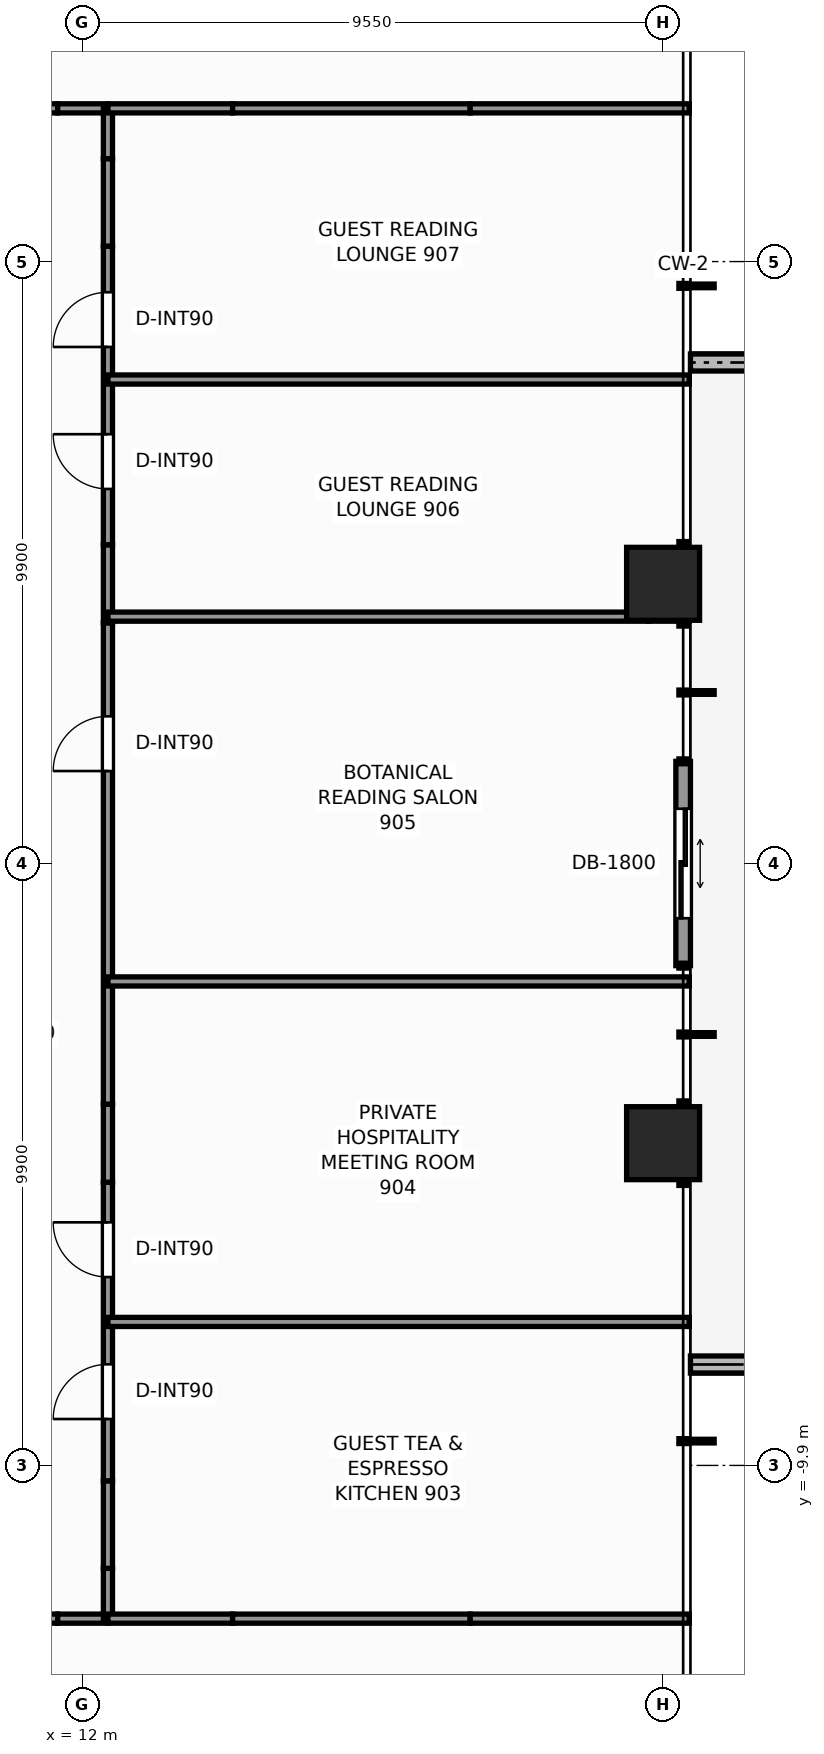
"""IFC4 building model, lengths in metres.
Left out: names, types, materials, properties, quantities, classifications, styles, units other than length and angle.
Written with IfcOpenShell. Run it as: python <this file> out.ifc"""

import sys

from ifc_helpers import new_model, si_unit, direction, frame, frame_2d, origin, origin_2d, place, context, subcontext, project, spatial, rectangle, extrude, element, fill, save


model = new_model("IFC4")
c1 = context("Model", 3, precision=1e-05, world=origin(), true_north=direction((0.0, 1.0)))
c2 = subcontext(c1, "Body", "Model", "MODEL_VIEW")
j1 = project(units=[si_unit("LENGTHUNIT", "METRE"), si_unit("PLANEANGLEUNIT", "RADIAN")], contexts=[c1])
p1 = place(None, origin())
s1 = spatial("IfcSite", under=j1, at=p1, CompositionType="ELEMENT")
p2 = place(p1, origin())
s2 = spatial("IfcBuilding", under=s1, at=p2, CompositionType="ELEMENT")
p3 = place(p2, frame((0.0, 0.0, 33.7)))
s3 = spatial("IfcBuildingStorey", under=s2, at=p3, CompositionType="ELEMENT", Elevation=33.7)
for number, where, z_axis, x_axis in (
    (1, (21.55, -4.6, 0.0), (0.0, 0.0, 1.0), (1.0, 0.0, 0.0)),
    (2, (21.55, 4.6, 0.0), (0.0, 0.0, 1.0), (1.0, 0.0, 0.0)),
):
    element("IfcColumn", number, at=place(p3, frame(where, z_axis=z_axis, x_axis=x_axis)), inside=s3, PredefinedType="COLUMN", context=c2, shape_type="SweptSolid", body=[
        extrude(rectangle(XDim=1.2, YDim=1.2, at=origin_2d()), origin(), (0.0, 0.0, 1.0), 3.3),
    ])
p4 = place(p3, frame((24.975, 8.24, -0.06), z_axis=(0.0, 0.0, 1.0), x_axis=(-1.0, 0.0, 0.0)))
e3 = element("IfcWall", 3, at=p4, inside=s3, PredefinedType="PARAPET", context=c2, shape_type="SweptSolid", body=[
    extrude(rectangle(XDim=2.975, YDim=0.28, at=frame_2d((1.487, 0.0))), origin(), (0.0, 0.0, 1.0), 0.42),
])
p5 = place(p3, frame((22.0, -8.24, -0.06), z_axis=(0.0, 0.0, 1.0), x_axis=(1.0, 0.0, 0.0)))
e4 = element("IfcWall", 4, at=p5, inside=s3, PredefinedType="PARAPET", context=c2, shape_type="SweptSolid", body=[
    extrude(rectangle(XDim=3.42, YDim=0.28, at=frame_2d((1.71, 0.0))), origin(), (0.0, 0.0, 1.0), 0.42),
])
p6 = place(p3, frame((21.88, 1.68, 0.0), z_axis=(0.0, 0.0, 1.0), x_axis=(0.0, -1.0, 0.0)))
e5 = element("IfcWall", 5, at=p6, inside=s3, PredefinedType="STANDARD", context=c2, shape_type="SweptSolid", body=[
    extrude(rectangle(XDim=3.36, YDim=0.24, at=frame_2d((1.68, 0.0))), origin(), (0.0, 0.0, 1.0), 3.06),
])
p7 = place(p6, frame((0.78, 0.0, 0.0)))
e6 = element("IfcOpeningElement", 6, at=p7, cuts=e5, PredefinedType="OPENING", context=c2, shape_type="SweptSolid", body=[
    extrude(rectangle(XDim=1.8, YDim=2.2, at=frame_2d((0.9, 1.1))), frame((0.0, 0.13, 0.0), z_axis=(0.0, -1.0, 0.0), x_axis=(1.0, 0.0, 0.0)), (0.0, 0.0, 1.0), 0.26),
])
p8 = place(p3, frame((10.154, -12.42, 0.0), z_axis=(0.0, 0.0, 1.0), x_axis=(1.0, 0.0, 0.0)))
e7 = element("IfcWall", 7, at=p8, inside=s3, PredefinedType="PARTITIONING", context=c2, shape_type="SweptSolid", body=[
    extrude(rectangle(XDim=1.439, YDim=0.15, at=frame_2d((0.72, 0.0))), origin(), (0.0, 0.0, 1.0), 1.945),
])
p9 = place(p3, frame((11.593, -12.42, 0.0), z_axis=(0.0, 0.0, 1.0), x_axis=(1.0, 0.0, 0.0)))
e8 = element("IfcWall", 8, at=p9, inside=s3, PredefinedType="PARTITIONING", context=c2, shape_type="SweptSolid", body=[
    extrude(rectangle(XDim=0.827, YDim=0.15, at=frame_2d((0.414, 0.0))), origin(), (0.0, 0.0, 1.0), 3.06),
])
p10 = place(p3, frame((10.154, 12.42, 0.0), z_axis=(0.0, 0.0, 1.0), x_axis=(1.0, 0.0, 0.0)))
e9 = element("IfcWall", 9, at=p10, inside=s3, PredefinedType="PARTITIONING", context=c2, shape_type="SweptSolid", body=[
    extrude(rectangle(XDim=1.439, YDim=0.15, at=frame_2d((0.72, 0.0))), origin(), (0.0, 0.0, 1.0), 1.945),
])
for number, where, z_axis, x_axis in (
    (10, (11.593, 12.42, 0.0), (0.0, 0.0, 1.0), (1.0, 0.0, 0.0)),
    (11, (12.42, -12.42, 0.0), (0.0, 0.0, 1.0), (0.0, 1.0, 0.0)),
):
    element("IfcWall", number, at=place(p3, frame(where, z_axis=z_axis, x_axis=x_axis)), inside=s3, PredefinedType="PARTITIONING", context=c2, shape_type="SweptSolid", body=[
        extrude(rectangle(XDim=0.827, YDim=0.15, at=frame_2d((0.414, 0.0))), origin(), (0.0, 0.0, 1.0), 3.06),
    ])
p11 = place(p3, frame((12.42, -11.593, 0.0), z_axis=(0.0, 0.0, 1.0), x_axis=(0.0, 1.0, 0.0)))
e12 = element("IfcWall", 12, at=p11, inside=s3, PredefinedType="PARTITIONING", context=c2, shape_type="SweptSolid", body=[
    extrude(rectangle(XDim=1.439, YDim=0.15, at=frame_2d((0.72, 0.0))), origin(), (0.0, 0.0, 1.0), 1.945),
])
p12 = place(p3, frame((12.42, -10.154, 0.0), z_axis=(0.0, 0.0, 1.0), x_axis=(0.0, 1.0, 0.0)))
e13 = element("IfcWall", 13, at=p12, inside=s3, PredefinedType="PARTITIONING", context=c2, shape_type="SweptSolid", body=[
    extrude(rectangle(XDim=4.912, YDim=0.15, at=frame_2d((2.456, 0.0))), origin(), (0.0, 0.0, 1.0), 3.06),
])
p13 = place(p12, frame((1.017, 0.0, 0.0)))
e14 = element("IfcOpeningElement", 14, at=p13, cuts=e13, PredefinedType="OPENING", context=c2, shape_type="SweptSolid", body=[
    extrude(rectangle(XDim=0.9, YDim=2.06, at=frame_2d((0.45, 1.03))), frame((0.0, 0.085, 0.0), z_axis=(0.0, -1.0, 0.0), x_axis=(1.0, 0.0, 0.0)), (0.0, 0.0, 1.0), 0.17),
])
p14 = place(p12, frame((3.352, 0.0, 0.0)))
e15 = element("IfcOpeningElement", 15, at=p14, cuts=e13, PredefinedType="OPENING", context=c2, shape_type="SweptSolid", body=[
    extrude(rectangle(XDim=0.9, YDim=2.06, at=frame_2d((0.45, 1.03))), frame((0.0, 0.085, 0.0), z_axis=(0.0, -1.0, 0.0), x_axis=(1.0, 0.0, 0.0)), (0.0, 0.0, 1.0), 0.17),
])
p15 = place(p3, frame((12.42, -5.242, 0.0), z_axis=(0.0, 0.0, 1.0), x_axis=(0.0, 1.0, 0.0)))
e16 = element("IfcWall", 16, at=p15, inside=s3, PredefinedType="PARTITIONING", context=c2, shape_type="SweptSolid", body=[
    extrude(rectangle(XDim=1.284, YDim=0.15, at=frame_2d((0.642, 0.0))), origin(), (0.0, 0.0, 1.0), 1.945),
])
p16 = place(p3, frame((12.42, -3.958, 0.0), z_axis=(0.0, 0.0, 1.0), x_axis=(0.0, 1.0, 0.0)))
e17 = element("IfcWall", 17, at=p16, inside=s3, PredefinedType="PARTITIONING", context=c2, shape_type="SweptSolid", body=[
    extrude(rectangle(XDim=7.916, YDim=0.15, at=frame_2d((3.958, 0.0))), origin(), (0.0, 0.0, 1.0), 2.585),
])
p17 = place(p16, frame((5.479, 0.0, 0.0)))
e18 = element("IfcOpeningElement", 18, at=p17, cuts=e17, PredefinedType="OPENING", context=c2, shape_type="SweptSolid", body=[
    extrude(rectangle(XDim=0.9, YDim=2.06, at=frame_2d((0.45, 1.03))), frame((0.0, 0.085, 0.0), z_axis=(0.0, -1.0, 0.0), x_axis=(1.0, 0.0, 0.0)), (0.0, 0.0, 1.0), 0.17),
])
p18 = place(p3, frame((12.42, 3.958, 0.0), z_axis=(0.0, 0.0, 1.0), x_axis=(0.0, 1.0, 0.0)))
e19 = element("IfcWall", 19, at=p18, inside=s3, PredefinedType="PARTITIONING", context=c2, shape_type="SweptSolid", body=[
    extrude(rectangle(XDim=1.284, YDim=0.15, at=frame_2d((0.642, 0.0))), origin(), (0.0, 0.0, 1.0), 1.945),
])
p19 = place(p3, frame((12.42, 5.242, 0.0), z_axis=(0.0, 0.0, 1.0), x_axis=(0.0, 1.0, 0.0)))
e20 = element("IfcWall", 20, at=p19, inside=s3, PredefinedType="PARTITIONING", context=c2, shape_type="SweptSolid", body=[
    extrude(rectangle(XDim=4.912, YDim=0.15, at=frame_2d((2.456, 0.0))), origin(), (0.0, 0.0, 1.0), 3.06),
])
p20 = place(p19, frame((0.919, 0.0, 0.0)))
e21 = element("IfcOpeningElement", 21, at=p20, cuts=e20, PredefinedType="OPENING", context=c2, shape_type="SweptSolid", body=[
    extrude(rectangle(XDim=0.9, YDim=2.06, at=frame_2d((0.45, 1.03))), frame((0.0, 0.085, 0.0), z_axis=(0.0, -1.0, 0.0), x_axis=(1.0, 0.0, 0.0)), (0.0, 0.0, 1.0), 0.17),
])
p21 = place(p19, frame((3.254, 0.0, 0.0)))
e22 = element("IfcOpeningElement", 22, at=p21, cuts=e20, PredefinedType="OPENING", context=c2, shape_type="SweptSolid", body=[
    extrude(rectangle(XDim=0.9, YDim=2.06, at=frame_2d((0.45, 1.03))), frame((0.0, 0.085, 0.0), z_axis=(0.0, -1.0, 0.0), x_axis=(1.0, 0.0, 0.0)), (0.0, 0.0, 1.0), 0.17),
])
p22 = place(p3, frame((12.42, 10.154, 0.0), z_axis=(0.0, 0.0, 1.0), x_axis=(0.0, 1.0, 0.0)))
e23 = element("IfcWall", 23, at=p22, inside=s3, PredefinedType="PARTITIONING", context=c2, shape_type="SweptSolid", body=[
    extrude(rectangle(XDim=1.439, YDim=0.15, at=frame_2d((0.72, 0.0))), origin(), (0.0, 0.0, 1.0), 1.945),
])
p23 = place(p3, frame((12.42, 11.593, 0.0), z_axis=(0.0, 0.0, 1.0), x_axis=(0.0, 1.0, 0.0)))
e24 = element("IfcWall", 24, at=p23, inside=s3, PredefinedType="PARTITIONING", context=c2, shape_type="SweptSolid", body=[
    extrude(rectangle(XDim=0.827, YDim=0.15, at=frame_2d((0.414, 0.0))), origin(), (0.0, 0.0, 1.0), 3.06),
])
p24 = place(p3, frame((12.42, -12.42, 0.0), z_axis=(0.0, 0.0, 1.0), x_axis=(1.0, 0.0, 0.0)))
e25 = element("IfcWall", 25, at=p24, inside=s3, PredefinedType="PARTITIONING", context=c2, shape_type="SweptSolid", body=[
    extrude(rectangle(XDim=2.05, YDim=0.15, at=frame_2d((1.025, 0.0))), origin(), (0.0, 0.0, 1.0), 3.06),
])
p25 = place(p3, frame((14.47, -12.42, 0.0), z_axis=(0.0, 0.0, 1.0), x_axis=(1.0, 0.0, 0.0)))
e26 = element("IfcWall", 26, at=p25, inside=s3, PredefinedType="PARTITIONING", context=c2, shape_type="SweptSolid", body=[
    extrude(rectangle(XDim=3.907, YDim=0.15, at=frame_2d((1.954, 0.0))), origin(), (0.0, 0.0, 1.0), 1.945),
])
p26 = place(p3, frame((18.378, -12.42, 0.0), z_axis=(0.0, 0.0, 1.0), x_axis=(1.0, 0.0, 0.0)))
e27 = element("IfcWall", 27, at=p26, inside=s3, PredefinedType="PARTITIONING", context=c2, shape_type="SweptSolid", body=[
    extrude(rectangle(XDim=3.602, YDim=0.15, at=frame_2d((1.801, 0.0))), origin(), (0.0, 0.0, 1.0), 2.429),
])
p27 = place(p3, frame((12.42, 12.42, 0.0), z_axis=(0.0, 0.0, 1.0), x_axis=(1.0, 0.0, 0.0)))
e28 = element("IfcWall", 28, at=p27, inside=s3, PredefinedType="PARTITIONING", context=c2, shape_type="SweptSolid", body=[
    extrude(rectangle(XDim=2.05, YDim=0.15, at=frame_2d((1.025, 0.0))), origin(), (0.0, 0.0, 1.0), 3.06),
])
p28 = place(p3, frame((14.47, 12.42, 0.0), z_axis=(0.0, 0.0, 1.0), x_axis=(1.0, 0.0, 0.0)))
e29 = element("IfcWall", 29, at=p28, inside=s3, PredefinedType="PARTITIONING", context=c2, shape_type="SweptSolid", body=[
    extrude(rectangle(XDim=3.907, YDim=0.15, at=frame_2d((1.954, 0.0))), origin(), (0.0, 0.0, 1.0), 1.945),
])
p29 = place(p3, frame((18.378, 12.42, 0.0), z_axis=(0.0, 0.0, 1.0), x_axis=(1.0, 0.0, 0.0)))
e30 = element("IfcWall", 30, at=p29, inside=s3, PredefinedType="PARTITIONING", context=c2, shape_type="SweptSolid", body=[
    extrude(rectangle(XDim=3.602, YDim=0.15, at=frame_2d((1.801, 0.0))), origin(), (0.0, 0.0, 1.0), 2.429),
])
for number, where, z_axis, x_axis in (
    (31, (12.42, -7.54, 0.0), (0.0, 0.0, 1.0), (1.0, 0.0, 0.0)),
    (32, (12.42, -1.94, 0.0), (0.0, 0.0, 1.0), (1.0, 0.0, 0.0)),
):
    element("IfcWall", number, at=place(p3, frame(where, z_axis=z_axis, x_axis=x_axis)), inside=s3, PredefinedType="PARTITIONING", context=c2, shape_type="SweptSolid", body=[
        extrude(rectangle(XDim=9.56, YDim=0.15, at=frame_2d((4.78, 0.0))), origin(), (0.0, 0.0, 1.0), 2.429),
    ])
p30 = place(p3, frame((12.42, 4.06, 0.0), z_axis=(0.0, 0.0, 1.0), x_axis=(1.0, 0.0, 0.0)))
e33 = element("IfcWall", 33, at=p30, inside=s3, PredefinedType="PARTITIONING", context=c2, shape_type="SweptSolid", body=[
    extrude(rectangle(XDim=8.89, YDim=0.15, at=frame_2d((4.445, 0.0))), origin(), (0.0, 0.0, 1.0), 1.945),
])
p31 = place(p3, frame((21.31, 4.06, 0.0), z_axis=(0.0, 0.0, 1.0), x_axis=(1.0, 0.0, 0.0)))
e34 = element("IfcWall", 34, at=p31, inside=s3, PredefinedType="PARTITIONING", context=c2, shape_type="SweptSolid", body=[
    extrude(rectangle(XDim=0.67, YDim=0.15, at=frame_2d((0.335, 0.0))), origin(), (0.0, 0.0, 1.0), 2.429),
])
p32 = place(p3, frame((12.42, 7.96, 0.0), z_axis=(0.0, 0.0, 1.0), x_axis=(1.0, 0.0, 0.0)))
e35 = element("IfcWall", 35, at=p32, inside=s3, PredefinedType="PARTITIONING", context=c2, shape_type="SweptSolid", body=[
    extrude(rectangle(XDim=9.56, YDim=0.15, at=frame_2d((4.78, 0.0))), origin(), (0.0, 0.0, 1.0), 2.429),
])
p33 = place(p7, origin())
e36 = element("IfcDoor", 36, at=p33, inside=s3, OperationType="DOUBLE_DOOR_SLIDING", PredefinedType="DOOR", context=c2, shape_type="SweptSolid", body=[
    extrude(rectangle(XDim=1.8, YDim=2.2, at=frame_2d((0.9, 1.1))), frame((0.0, 0.025, 0.0), z_axis=(0.0, -1.0, 0.0), x_axis=(1.0, 0.0, 0.0)), (0.0, 0.0, 1.0), 0.05),
])
fill(e6, e36)
p34 = place(p13, origin())
e37 = element("IfcDoor", 37, at=p34, inside=s3, OperationType="SINGLE_SWING_LEFT", PredefinedType="DOOR", context=c2, shape_type="SweptSolid", body=[
    extrude(rectangle(XDim=0.9, YDim=2.06, at=frame_2d((0.45, 1.03))), frame((0.0, 0.025, 0.0), z_axis=(0.0, -1.0, 0.0), x_axis=(1.0, 0.0, 0.0)), (0.0, 0.0, 1.0), 0.05),
])
fill(e14, e37)
p35 = place(p14, origin())
e38 = element("IfcDoor", 38, at=p35, inside=s3, OperationType="SINGLE_SWING_RIGHT", PredefinedType="DOOR", context=c2, shape_type="SweptSolid", body=[
    extrude(rectangle(XDim=0.9, YDim=2.06, at=frame_2d((0.45, 1.03))), frame((0.0, 0.025, 0.0), z_axis=(0.0, -1.0, 0.0), x_axis=(1.0, 0.0, 0.0)), (0.0, 0.0, 1.0), 0.05),
])
fill(e15, e38)
p36 = place(p17, origin())
e39 = element("IfcDoor", 39, at=p36, inside=s3, OperationType="SINGLE_SWING_LEFT", PredefinedType="DOOR", context=c2, shape_type="SweptSolid", body=[
    extrude(rectangle(XDim=0.9, YDim=2.06, at=frame_2d((0.45, 1.03))), frame((0.0, 0.025, 0.0), z_axis=(0.0, -1.0, 0.0), x_axis=(1.0, 0.0, 0.0)), (0.0, 0.0, 1.0), 0.05),
])
fill(e18, e39)
p37 = place(p20, origin())
e40 = element("IfcDoor", 40, at=p37, inside=s3, OperationType="SINGLE_SWING_RIGHT", PredefinedType="DOOR", context=c2, shape_type="SweptSolid", body=[
    extrude(rectangle(XDim=0.9, YDim=2.06, at=frame_2d((0.45, 1.03))), frame((0.0, 0.025, 0.0), z_axis=(0.0, -1.0, 0.0), x_axis=(1.0, 0.0, 0.0)), (0.0, 0.0, 1.0), 0.05),
])
fill(e21, e40)
p38 = place(p21, origin())
e41 = element("IfcDoor", 41, at=p38, inside=s3, OperationType="SINGLE_SWING_LEFT", PredefinedType="DOOR", context=c2, shape_type="SweptSolid", body=[
    extrude(rectangle(XDim=0.9, YDim=2.06, at=frame_2d((0.45, 1.03))), frame((0.0, 0.025, 0.0), z_axis=(0.0, -1.0, 0.0), x_axis=(1.0, 0.0, 0.0)), (0.0, 0.0, 1.0), 0.05),
])
fill(e22, e41)
save(model, sys.argv[1])
